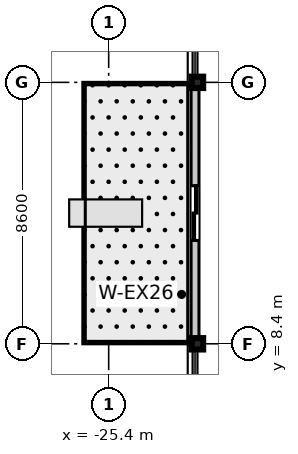
"""IFC4 building model, lengths in metres.
Left out: names, types, materials, properties, quantities, classifications, styles, units other than length and angle.
Written with IfcOpenShell. Run it as: python <this file> out.ifc"""

import sys

from ifc_helpers import new_model, si_unit, direction, frame, frame_2d, origin, origin_2d, place, context, subcontext, project, spatial, rectangle, i_section, extrude, source, transform, mapped, element, fill, save


model = new_model("IFC4")
c1 = context("Model", 3, precision=1e-05, world=origin(), true_north=direction((0.0, 1.0)))
c2 = subcontext(c1, "Body", "Model", "MODEL_VIEW")
j1 = project(units=[si_unit("LENGTHUNIT", "METRE"), si_unit("PLANEANGLEUNIT", "RADIAN")], contexts=[c1])
p1 = place(None, origin())
s1 = spatial("IfcSite", under=j1, at=p1, CompositionType="ELEMENT")
p2 = place(p1, origin())
s2 = spatial("IfcBuilding", under=s1, at=p2, CompositionType="ELEMENT")
p3 = place(p2, frame((0.0, 0.0, 273.8)))
s3 = spatial("IfcBuildingStorey", under=s2, at=p3, CompositionType="ELEMENT", Elevation=273.8)
m1 = source(origin(), c2, "Body", "SweptSolid", [
    extrude(i_section(OverallWidth=0.374, OverallDepth=0.374, WebThickness=0.014, FlangeThickness=0.023, at=origin_2d()), origin(), (0.0, 0.0, 1.0), 3.705),
])
for number, where, z_axis, x_axis in (
    (1, (-22.48, 8.4, 0.0), (0.0, 0.0, 1.0), (1.0, 0.0, 0.0)),
    (2, (-22.48, 17.0, 0.0), (0.0, 0.0, 1.0), (1.0, 0.0, 0.0)),
):
    element("IfcColumn", number, at=place(p3, frame(where, z_axis=z_axis, x_axis=x_axis)), inside=s3, PredefinedType="COLUMN", context=c2, shape_type="MappedRepresentation", body=[
        mapped(m1, transform((0.0, 0.0, 0.0), scale=1.0)),
    ])
m2 = source(origin(), c2, "Body", "SweptSolid", [
    extrude(rectangle(XDim=8.6, YDim=0.26, at=frame_2d((4.3, 0.0))), origin(), (0.0, 0.0, 1.0), 2.93),
])
p4 = place(p3, frame((-22.56, 8.4, 0.0), z_axis=(0.0, 0.0, 1.0), x_axis=(0.0, 1.0, 0.0)))
e3 = element("IfcWall", 3, at=p4, inside=s3, PredefinedType="STANDARD", context=c2, shape_type="MappedRepresentation", body=[
    mapped(m2, transform((0.0, 0.0, 0.0), scale=1.0)),
])
p5 = place(p4, frame((3.4, 0.0, 0.0)))
e4 = element("IfcOpeningElement", 4, at=p5, cuts=e3, PredefinedType="OPENING", context=c2, shape_type="SweptSolid", body=[
    extrude(rectangle(XDim=1.8, YDim=2.25, at=frame_2d((0.9, 1.125))), frame((0.0, 0.14, 0.0), z_axis=(0.0, -1.0, 0.0), x_axis=(1.0, 0.0, 0.0)), (0.0, 0.0, 1.0), 0.28),
])
m3 = source(origin(), c2, "Body", "SweptSolid", [
    extrude(rectangle(XDim=1.8, YDim=2.25, at=frame_2d((0.9, 1.125))), frame((0.0, 0.025, 0.0), z_axis=(0.0, -1.0, 0.0), x_axis=(1.0, 0.0, 0.0)), (0.0, 0.0, 1.0), 0.05),
])
p6 = place(p5, origin())
e5 = element("IfcDoor", 5, at=p6, inside=s3, OperationType="DOUBLE_DOOR_SLIDING", PredefinedType="DOOR", context=c2, shape_type="MappedRepresentation", body=[
    mapped(m3, transform((0.0, 0.0, 0.0), scale=1.0)),
])
fill(e4, e5)
save(model, sys.argv[1])
